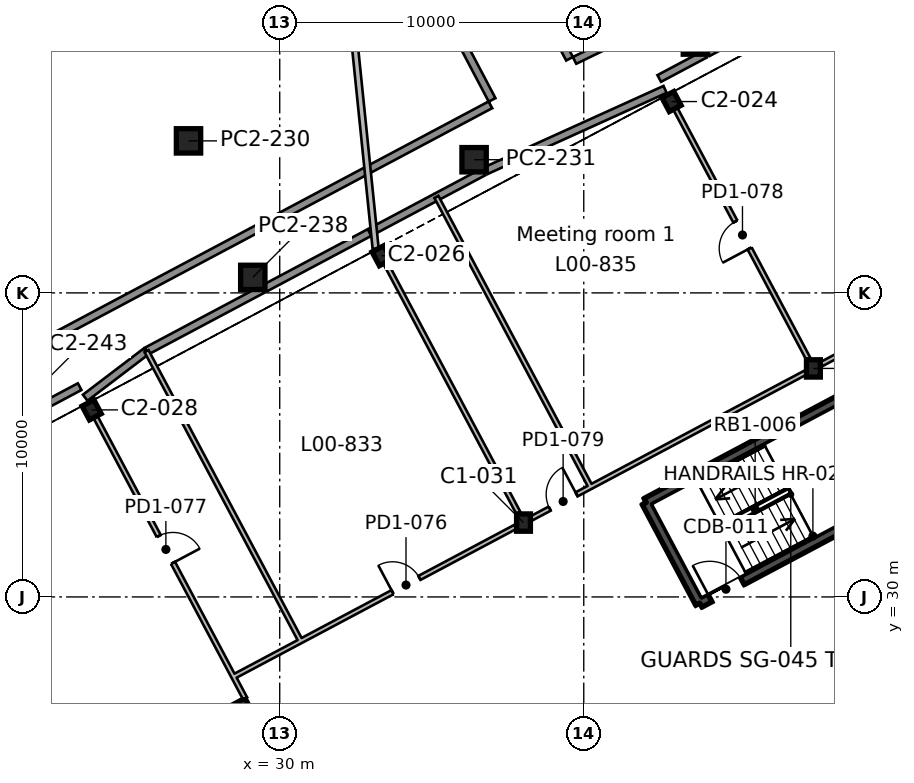
"""IFC4 building model, lengths in metres.
Left out: names, types, materials, properties, quantities, classifications, styles, units other than length and angle.
Written with IfcOpenShell. Run it as: python <this file> out.ifc"""

import sys

from ifc_helpers import new_model, si_unit, direction, frame, frame_2d, origin, origin_2d, place, context, subcontext, project, spatial, rectangle, i_section, extrude, element, fill, save


model = new_model("IFC4")
c1 = context("Model", 3, precision=1e-05, world=origin(), true_north=direction((0.0, 1.0)))
c2 = subcontext(c1, "Body", "Model", "MODEL_VIEW")
j1 = project(units=[si_unit("LENGTHUNIT", "METRE"), si_unit("PLANEANGLEUNIT", "RADIAN")], contexts=[c1])
p1 = place(None, origin())
s1 = spatial("IfcSite", under=j1, at=p1, CompositionType="ELEMENT")
p2 = place(p1, origin())
s2 = spatial("IfcBuilding", under=s1, at=p2, CompositionType="ELEMENT")
p3 = place(p2, origin())
s3 = spatial("IfcBuildingStorey", under=s2, at=p3, CompositionType="ELEMENT", Elevation=0.0)
p4 = place(p3, frame((38.018, 32.446, 0.0), z_axis=(0.0, 0.0, 1.0), x_axis=(1.0, 0.0, 0.0)))
e1 = element("IfcColumn", 1, at=p4, inside=s3, PredefinedType="COLUMN", context=c2, shape_type="SweptSolid", body=[
    extrude(i_section(OverallWidth=0.455, OverallDepth=0.569, WebThickness=0.078, FlangeThickness=0.125, FilletRadius=0.015, at=origin_2d()), origin(), (0.0, 0.0, 1.0), 7.0),
])
p5 = place(p3, frame((23.815, 36.152, 0.0), z_axis=(0.0, 0.0, 1.0), x_axis=(-0.882947592859, -0.469471562786, 0.0)))
e2 = element("IfcColumn", 2, at=p5, inside=s3, PredefinedType="COLUMN", context=c2, shape_type="SweptSolid", body=[
    extrude(i_section(OverallWidth=0.437, OverallDepth=0.513, WebThickness=0.061, FlangeThickness=0.097, FilletRadius=0.015, at=origin_2d()), origin(), (0.0, 0.0, 1.0), 7.0),
])
p6 = place(p3, frame((47.553, 37.516, 0.0), z_axis=(0.0, 0.0, 1.0), x_axis=(1.0, 0.0, 0.0)))
e3 = element("IfcColumn", 3, at=p6, inside=s3, PredefinedType="COLUMN", context=c2, shape_type="SweptSolid", body=[
    extrude(i_section(OverallWidth=0.455, OverallDepth=0.569, WebThickness=0.078, FlangeThickness=0.125, FilletRadius=0.015, at=origin_2d()), origin(), (0.0, 0.0, 1.0), 7.0),
])
for number, where, z_axis, x_axis in (
    (4, (33.351, 41.223, 0.0), (0.0, 0.0, 1.0), (-0.883, -0.469, 0.0)),
    (5, (42.887, 46.293, 0.0), (0.0, 0.0, 1.0), (-0.883, -0.469, 0.0)),
):
    element("IfcColumn", number, at=place(p3, frame(where, z_axis=z_axis, x_axis=x_axis)), inside=s3, PredefinedType="COLUMN", context=c2, shape_type="SweptSolid", body=[
        extrude(i_section(OverallWidth=0.437, OverallDepth=0.513, WebThickness=0.061, FlangeThickness=0.097, FilletRadius=0.015, at=origin_2d()), origin(), (0.0, 0.0, 1.0), 7.0),
    ])
p7 = place(p3, frame((37.849, 8.799, 0.0), z_axis=(0.0, 0.0, 1.0), x_axis=(-0.469465789982, 0.882950662289, 0.0)))
e6 = element("IfcWall", 6, at=p7, inside=s3, PredefinedType="SHEAR", context=c2, shape_type="SweptSolid", body=[
    extrude(rectangle(XDim=20.0, YDim=0.9, at=frame_2d((10.0, 0.0))), origin(), (0.0, 0.0, 1.0), 7.0),
])
p8 = place(p7, frame((10.6, 0.0, 0.0)))
e7 = element("IfcOpeningElement", 7, at=p8, cuts=e6, PredefinedType="OPENING", context=c2, shape_type="SweptSolid", body=[
    extrude(rectangle(XDim=2.4, YDim=2.4, at=frame_2d((1.2, 1.2))), frame((0.0, 0.46, 0.0), z_axis=(0.0, -1.0, 0.0), x_axis=(1.0, 0.0, 0.0)), (0.0, 0.0, 1.0), 0.92),
])
p9 = place(p3, frame((51.145, 33.693, 0.0), z_axis=(0.0, 0.0, 1.0), x_axis=(-0.882945809314, -0.469474917132, 0.0)))
e8 = element("IfcWall", 8, at=p9, inside=s3, PredefinedType="SHEAR", context=c2, shape_type="SweptSolid", body=[
    extrude(rectangle(XDim=8.3, YDim=0.3, at=frame_2d((4.15, 0.0))), origin(), (0.0, 0.0, 1.0), 7.0),
])
p10 = place(p9, frame((6.725, 0.0, 0.0)))
e9 = element("IfcOpeningElement", 9, at=p10, cuts=e8, PredefinedType="OPENING", context=c2, shape_type="SweptSolid", body=[
    extrude(rectangle(XDim=1.2, YDim=2.1, at=frame_2d((0.6, 1.05))), frame((0.0, 0.16, 0.0), z_axis=(0.0, -1.0, 0.0), x_axis=(1.0, 0.0, 0.0)), (0.0, 0.0, 1.0), 0.32),
])
p11 = place(p3, frame((43.816, 29.796, 0.0), z_axis=(0.0, 0.0, 1.0), x_axis=(-0.46946936446, 0.882948761726, 0.0)))
e10 = element("IfcWall", 10, at=p11, inside=s3, PredefinedType="SHEAR", context=c2, shape_type="SweptSolid", body=[
    extrude(rectangle(XDim=3.75, YDim=0.3, at=frame_2d((1.875, 0.0))), origin(), (0.0, 0.0, 1.0), 7.0),
])
p12 = place(p3, frame((42.055, 33.107, 0.0), z_axis=(0.0, 0.0, 1.0), x_axis=(0.882945809314, 0.469474917132, 0.0)))
e11 = element("IfcWall", 11, at=p12, inside=s3, PredefinedType="SHEAR", context=c2, shape_type="SweptSolid", body=[
    extrude(rectangle(XDim=8.3, YDim=0.3, at=frame_2d((4.15, 0.0))), origin(), (0.0, 0.0, 1.0), 7.0),
])
for number, where, z_axis, x_axis in (
    (12, (29.114, 40.51, 0.0), (0.0, 0.0, 1.0), (1.0, 0.0, 0.0)),
    (13, (36.393, 44.38, 0.0), (0.0, 0.0, 1.0), (1.0, 0.0, 0.0)),
    (14, (27.0, 45.0, 0.0), (0.0, 0.0, 1.0), (1.0, 0.0, 0.0)),
    (15, (43.672, 48.25, 0.0), (0.0, 0.0, 1.0), (1.0, 0.0, 0.0)),
):
    element("IfcColumn", number, at=place(p3, frame(where, z_axis=z_axis, x_axis=x_axis)), inside=s3, PredefinedType="COLUMN", context=c2, shape_type="SweptSolid", body=[
        extrude(rectangle(XDim=0.8, YDim=0.8, at=origin_2d()), origin(), (0.0, 0.0, 1.0), 6.37),
    ])
p13 = place(p3, frame((30.357, 58.915, 7.0), z_axis=(0.0, 0.0, 1.0), x_axis=(0.466457319903, -0.8845437065, 0.0)))
e16 = element("IfcWall", 16, at=p13, inside=s3, PredefinedType="STANDARD", context=c2, shape_type="SweptSolid", body=[
    extrude(rectangle(XDim=14.208, YDim=0.25, at=frame_2d((7.104, 0.0))), origin(), (0.0, 0.0, 1.0), 0.65),
])
p14 = place(p3, frame((36.929, 46.186, 7.0), z_axis=(0.0, 0.0, 1.0), x_axis=(-0.882949235495, -0.469468473423, 0.0)))
e17 = element("IfcWall", 17, at=p14, inside=s3, PredefinedType="STANDARD", context=c2, shape_type="SweptSolid", body=[
    extrude(rectangle(XDim=28.414, YDim=0.25, at=frame_2d((14.207, 0.0))), origin(), (0.0, 0.0, 1.0), 0.65),
])
p15 = place(p3, frame((51.808, 53.523, 7.0), z_axis=(0.0, 0.0, 1.0), x_axis=(-0.89970966322, -0.436488856569, 0.0)))
e18 = element("IfcWall", 18, at=p15, inside=s3, PredefinedType="STANDARD", context=c2, shape_type="SweptSolid", body=[
    extrude(rectangle(XDim=13.462, YDim=0.25, at=frame_2d((6.731, 0.0))), origin(), (0.0, 0.0, 1.0), 0.65),
])
p16 = place(p3, frame((39.532, 47.701, 7.0), z_axis=(0.0, 0.0, 1.0), x_axis=(-0.465482185558, 0.88505724952, 0.0)))
e19 = element("IfcWall", 19, at=p16, inside=s3, PredefinedType="STANDARD", context=c2, shape_type="SweptSolid", body=[
    extrude(rectangle(XDim=12.795, YDim=0.25, at=frame_2d((6.398, 0.0))), origin(), (0.0, 0.0, 1.0), 0.65),
])
p17 = place(p3, frame((31.271, 59.866, 0.0), z_axis=(0.0, 0.0, 1.0), x_axis=(0.10182537806, -0.994802288087, 0.0)))
e20 = element("IfcWall", 20, at=p17, inside=s3, PredefinedType="PARTITIONING", context=c2, shape_type="SweptSolid", body=[
    extrude(rectangle(XDim=18.51, YDim=0.2, at=frame_2d((9.255, 0.0))), origin(), (0.0, 0.0, 1.0), 6.37),
])
p18 = place(p3, frame((32.989, 42.004, 0.0), z_axis=(0.0, 0.0, 1.0), x_axis=(0.882961044449, 0.46944626315, 0.0)))
e21 = element("IfcWall", 21, at=p18, inside=s3, PredefinedType="SOLIDWALL", context=c2, shape_type="SweptSolid", body=[
    extrude(rectangle(XDim=2.453, YDim=0.25, at=frame_2d((1.227, 0.0))), origin(), (0.0, 0.0, 1.0), 6.37),
])
p19 = place(p3, frame((35.155, 43.156, 0.0), z_axis=(0.0, 0.0, 1.0), x_axis=(0.882941057782, 0.469483853272, 0.0)))
e22 = element("IfcWall", 22, at=p19, inside=s3, PredefinedType="SOLIDWALL", context=c2, shape_type="SweptSolid", body=[
    extrude(rectangle(XDim=1.756, YDim=0.25, at=frame_2d((0.878, 0.0))), origin(), (0.0, 0.0, 1.0), 6.37),
])
p20 = place(p3, frame((36.793, 44.027, 0.0), z_axis=(0.0, 0.0, 1.0), x_axis=(0.910758391685, 0.412939646892, 0.0)))
e23 = element("IfcWall", 23, at=p20, inside=s3, PredefinedType="SOLIDWALL", context=c2, shape_type="SweptSolid", body=[
    extrude(rectangle(XDim=6.457, YDim=0.25, at=frame_2d((3.229, 0.0))), origin(), (0.0, 0.0, 1.0), 6.37),
])
p21 = place(p3, frame((42.483, 47.052, 0.0), z_axis=(0.0, 0.0, 1.0), x_axis=(0.882940813988, 0.469484311766, 0.0)))
e24 = element("IfcWall", 24, at=p21, inside=s3, PredefinedType="SOLIDWALL", context=c2, shape_type="SweptSolid", body=[
    extrude(rectangle(XDim=1.699, YDim=0.25, at=frame_2d((0.85, 0.0))), origin(), (0.0, 0.0, 1.0), 6.37),
])
p22 = place(p3, frame((44.072, 47.897, 0.0), z_axis=(0.0, 0.0, 1.0), x_axis=(0.882948932855, 0.469469042612, 0.0)))
e25 = element("IfcWall", 25, at=p22, inside=s3, PredefinedType="SOLIDWALL", context=c2, shape_type="SweptSolid", body=[
    extrude(rectangle(XDim=7.849, YDim=0.25, at=frame_2d((3.924, 0.0))), origin(), (0.0, 0.0, 1.0), 6.37),
])
p23 = place(p22, frame((3.424, 0.0, 0.0)))
e26 = element("IfcOpeningElement", 26, at=p23, cuts=e25, PredefinedType="OPENING", context=c2, shape_type="SweptSolid", body=[
    extrude(rectangle(XDim=1.0, YDim=2.1, at=frame_2d((0.5, 1.05))), frame((0.0, 0.135, 0.0), z_axis=(0.0, -1.0, 0.0), x_axis=(1.0, 0.0, 0.0)), (0.0, 0.0, 1.0), 0.27),
])
p24 = place(p3, frame((23.603, 36.552, 0.0), z_axis=(0.0, 0.0, 1.0), x_axis=(0.796006775893, 0.605287710706, 0.0)))
e27 = element("IfcWall", 27, at=p24, inside=s3, PredefinedType="SOLIDWALL", context=c2, shape_type="SweptSolid", body=[
    extrude(rectangle(XDim=2.513, YDim=0.25, at=frame_2d((1.256, 0.0))), origin(), (0.0, 0.0, 1.0), 6.37),
])
p25 = place(p3, frame((25.619, 38.085, 0.0), z_axis=(0.0, 0.0, 1.0), x_axis=(0.88292581618, 0.469512516471, 0.0)))
e28 = element("IfcWall", 28, at=p25, inside=s3, PredefinedType="SOLIDWALL", context=c2, shape_type="SweptSolid", body=[
    extrude(rectangle(XDim=4.313, YDim=0.25, at=frame_2d((2.156, 0.0))), origin(), (0.0, 0.0, 1.0), 6.37),
])
p26 = place(p3, frame((29.514, 40.156, 0.0), z_axis=(0.0, 0.0, 1.0), x_axis=(0.882952549127, 0.469462241283, 0.0)))
e29 = element("IfcWall", 29, at=p26, inside=s3, PredefinedType="SOLIDWALL", context=c2, shape_type="SweptSolid", body=[
    extrude(rectangle(XDim=3.895, YDim=0.25, at=frame_2d((1.948, 0.0))), origin(), (0.0, 0.0, 1.0), 6.37),
])
p27 = place(p3, frame((22.236, 36.287, 0.0), z_axis=(0.0, 0.0, 1.0), x_axis=(0.882931801402, 0.469501260993, 0.0)))
e30 = element("IfcWall", 30, at=p27, inside=s3, PredefinedType="SOLIDWALL", context=c2, shape_type="SweptSolid", body=[
    extrude(rectangle(XDim=1.341, YDim=0.25, at=frame_2d((0.67, 0.0))), origin(), (0.0, 0.0, 1.0), 6.37),
])
p28 = place(p3, frame((30.689, 28.549, 0.0), z_axis=(0.0, 0.0, 1.0), x_axis=(-0.882976601649, -0.46941700112, 0.0)))
e31 = element("IfcWall", 31, at=p28, inside=s3, PredefinedType="PARTITIONING", context=c2, shape_type="SweptSolid", body=[
    extrude(rectangle(XDim=2.5, YDim=0.15, at=frame_2d((1.25, 0.0))), origin(), (0.0, 0.0, 1.0), 6.55),
])
p29 = place(p3, frame((37.755, 32.307, 0.0), z_axis=(0.0, 0.0, 1.0), x_axis=(-0.882938312015, -0.469489017099, 0.0)))
e32 = element("IfcWall", 32, at=p29, inside=s3, PredefinedType="PARTITIONING", context=c2, shape_type="SweptSolid", body=[
    extrude(rectangle(XDim=8.003, YDim=0.15, at=frame_2d((4.001, 0.0))), origin(), (0.0, 0.0, 1.0), 6.55),
])
p30 = place(p29, frame((3.58, 0.0, 0.0)))
e33 = element("IfcOpeningElement", 33, at=p30, cuts=e32, PredefinedType="OPENING", context=c2, shape_type="SweptSolid", body=[
    extrude(rectangle(XDim=1.0, YDim=2.1, at=frame_2d((0.5, 1.05))), frame((0.0, 0.085, 0.0), z_axis=(0.0, -1.0, 0.0), x_axis=(1.0, 0.0, 0.0)), (0.0, 0.0, 1.0), 0.17),
])
p31 = place(p3, frame((40.225, 33.62, 0.0), z_axis=(0.0, 0.0, 1.0), x_axis=(-0.882972129196, -0.469425413739, 0.0)))
e34 = element("IfcWall", 34, at=p31, inside=s3, PredefinedType="PARTITIONING", context=c2, shape_type="SweptSolid", body=[
    extrude(rectangle(XDim=2.202, YDim=0.15, at=frame_2d((1.101, 0.0))), origin(), (0.0, 0.0, 1.0), 6.55),
])
p32 = place(p31, frame((0.523, 0.0, 0.0)))
e35 = element("IfcOpeningElement", 35, at=p32, cuts=e34, PredefinedType="OPENING", context=c2, shape_type="SweptSolid", body=[
    extrude(rectangle(XDim=1.0, YDim=2.1, at=frame_2d((0.5, 1.05))), frame((0.0, 0.085, 0.0), z_axis=(0.0, -1.0, 0.0), x_axis=(1.0, 0.0, 0.0)), (0.0, 0.0, 1.0), 0.17),
])
p33 = place(p3, frame((47.291, 37.376, 0.0), z_axis=(0.0, 0.0, 1.0), x_axis=(-0.882950155787, -0.469466742588, 0.0)))
e36 = element("IfcWall", 36, at=p33, inside=s3, PredefinedType="PARTITIONING", context=c2, shape_type="SweptSolid", body=[
    extrude(rectangle(XDim=8.002, YDim=0.15, at=frame_2d((4.001, 0.0))), origin(), (0.0, 0.0, 1.0), 6.55),
])
p34 = place(p3, frame((58.046, 43.095, 0.0), z_axis=(0.0, 0.0, 1.0), x_axis=(-0.882944872937, -0.469476678179, 0.0)))
e37 = element("IfcWall", 37, at=p34, inside=s3, PredefinedType="PARTITIONING", context=c2, shape_type="SweptSolid", body=[
    extrude(rectangle(XDim=11.586, YDim=0.15, at=frame_2d((5.793, 0.0))), origin(), (0.0, 0.0, 1.0), 6.55),
])
p35 = place(p34, frame((5.314, 0.0, 0.0)))
e38 = element("IfcOpeningElement", 38, at=p35, cuts=e37, PredefinedType="OPENING", context=c2, shape_type="SweptSolid", body=[
    extrude(rectangle(XDim=1.0, YDim=2.1, at=frame_2d((0.5, 1.05))), frame((0.0, 0.085, 0.0), z_axis=(0.0, -1.0, 0.0), x_axis=(1.0, 0.0, 0.0)), (0.0, 0.0, 1.0), 0.17),
])
p36 = place(p3, frame((28.485, 27.371, 0.0), z_axis=(0.0, 0.0, 1.0), x_axis=(0.469454908155, -0.882956448082, 0.0)))
e39 = element("IfcWall", 39, at=p36, inside=s3, PredefinedType="PARTITIONING", context=c2, shape_type="SweptSolid", body=[
    extrude(rectangle(XDim=0.794, YDim=0.15, at=frame_2d((0.397, 0.0))), origin(), (0.0, 0.0, 1.0), 6.55),
])
p37 = place(p3, frame((30.689, 28.549, 0.0), z_axis=(0.0, 0.0, 1.0), x_axis=(-0.469470880923, 0.882947955411, 0.0)))
e40 = element("IfcWall", 40, at=p37, inside=s3, PredefinedType="PARTITIONING", context=c2, shape_type="SweptSolid", body=[
    extrude(rectangle(XDim=10.8, YDim=0.15, at=frame_2d((5.4, 0.0))), origin(), (0.0, 0.0, 1.0), 6.55),
])
p38 = place(p3, frame((23.936, 35.926, 0.0), z_axis=(0.0, 0.0, 1.0), x_axis=(0.469473365889, -0.882946634129, 0.0)))
e41 = element("IfcWall", 41, at=p38, inside=s3, PredefinedType="PARTITIONING", context=c2, shape_type="SweptSolid", body=[
    extrude(rectangle(XDim=9.687, YDim=0.15, at=frame_2d((4.844, 0.0))), origin(), (0.0, 0.0, 1.0), 6.55),
])
p39 = place(p38, frame((4.442, 0.0, 0.0)))
e42 = element("IfcOpeningElement", 42, at=p39, cuts=e41, PredefinedType="OPENING", context=c2, shape_type="SweptSolid", body=[
    extrude(rectangle(XDim=1.0, YDim=2.1, at=frame_2d((0.5, 1.05))), frame((0.0, 0.085, 0.0), z_axis=(0.0, -1.0, 0.0), x_axis=(1.0, 0.0, 0.0)), (0.0, 0.0, 1.0), 0.17),
])
p40 = place(p3, frame((37.85, 32.762, 0.0), z_axis=(0.0, 0.0, 1.0), x_axis=(-0.469481854544, 0.882942120557, 0.0)))
e43 = element("IfcWall", 43, at=p40, inside=s3, PredefinedType="PARTITIONING", context=c2, shape_type="SweptSolid", body=[
    extrude(rectangle(XDim=9.326, YDim=0.15, at=frame_2d((4.663, 0.0))), origin(), (0.0, 0.0, 1.0), 6.55),
])
p41 = place(p3, frame((40.225, 33.62, 0.0), z_axis=(0.0, 0.0, 1.0), x_axis=(-0.469470880923, 0.882947955411, 0.0)))
e44 = element("IfcWall", 44, at=p41, inside=s3, PredefinedType="PARTITIONING", context=c2, shape_type="SweptSolid", body=[
    extrude(rectangle(XDim=10.8, YDim=0.15, at=frame_2d((5.4, 0.0))), origin(), (0.0, 0.0, 1.0), 6.55),
])
p42 = place(p3, frame((47.385, 37.832, 0.0), z_axis=(0.0, 0.0, 1.0), x_axis=(-0.469472297485, 0.882947202212, 0.0)))
e45 = element("IfcWall", 45, at=p42, inside=s3, PredefinedType="PARTITIONING", context=c2, shape_type="SweptSolid", body=[
    extrude(rectangle(XDim=9.326, YDim=0.15, at=frame_2d((4.663, 0.0))), origin(), (0.0, 0.0, 1.0), 6.55),
])
p43 = place(p42, frame((4.112, 0.0, 0.0)))
e46 = element("IfcOpeningElement", 46, at=p43, cuts=e45, PredefinedType="OPENING", context=c2, shape_type="SweptSolid", body=[
    extrude(rectangle(XDim=1.0, YDim=2.1, at=frame_2d((0.5, 1.05))), frame((0.0, 0.085, 0.0), z_axis=(0.0, -1.0, 0.0), x_axis=(1.0, 0.0, 0.0)), (0.0, 0.0, 1.0), 0.17),
])
p44 = place(p10, frame((1.2, 0.0, 0.0), z_axis=(0.0, 0.0, 1.0), x_axis=(-1.0, 0.0, 0.0)))
e47 = element("IfcDoor", 47, at=p44, inside=s3, OperationType="SINGLE_SWING_LEFT", PredefinedType="DOOR", context=c2, shape_type="SweptSolid", body=[
    extrude(rectangle(XDim=1.2, YDim=2.1, at=frame_2d((0.6, 1.05))), frame((0.0, 0.025, 0.0), z_axis=(0.0, -1.0, 0.0), x_axis=(1.0, 0.0, 0.0)), (0.0, 0.0, 1.0), 0.05),
])
fill(e9, e47)
p45 = place(p39, origin())
e48 = element("IfcDoor", 48, at=p45, inside=s3, OperationType="SINGLE_SWING_RIGHT", PredefinedType="DOOR", context=c2, shape_type="SweptSolid", body=[
    extrude(rectangle(XDim=1.0, YDim=2.1, at=frame_2d((0.5, 1.05))), frame((0.0, 0.025, 0.0), z_axis=(0.0, -1.0, 0.0), x_axis=(1.0, 0.0, 0.0)), (0.0, 0.0, 1.0), 0.05),
])
fill(e42, e48)
p46 = place(p30, frame((1.0, 0.0, 0.0), z_axis=(0.0, 0.0, 1.0), x_axis=(-1.0, 0.0, 0.0)))
e49 = element("IfcDoor", 49, at=p46, inside=s3, OperationType="SINGLE_SWING_LEFT", PredefinedType="DOOR", context=c2, shape_type="SweptSolid", body=[
    extrude(rectangle(XDim=1.0, YDim=2.1, at=frame_2d((0.5, 1.05))), frame((0.0, 0.025, 0.0), z_axis=(0.0, -1.0, 0.0), x_axis=(1.0, 0.0, 0.0)), (0.0, 0.0, 1.0), 0.05),
])
fill(e33, e49)
p47 = place(p32, frame((1.0, 0.0, 0.0), z_axis=(0.0, 0.0, 1.0), x_axis=(-1.0, 0.0, 0.0)))
e50 = element("IfcDoor", 50, at=p47, inside=s3, OperationType="SINGLE_SWING_RIGHT", PredefinedType="DOOR", context=c2, shape_type="SweptSolid", body=[
    extrude(rectangle(XDim=1.0, YDim=2.1, at=frame_2d((0.5, 1.05))), frame((0.0, 0.025, 0.0), z_axis=(0.0, -1.0, 0.0), x_axis=(1.0, 0.0, 0.0)), (0.0, 0.0, 1.0), 0.05),
])
fill(e35, e50)
p48 = place(p43, origin())
e51 = element("IfcDoor", 51, at=p48, inside=s3, OperationType="SINGLE_SWING_LEFT", PredefinedType="DOOR", context=c2, shape_type="SweptSolid", body=[
    extrude(rectangle(XDim=1.0, YDim=2.1, at=frame_2d((0.5, 1.05))), frame((0.0, 0.025, 0.0), z_axis=(0.0, -1.0, 0.0), x_axis=(1.0, 0.0, 0.0)), (0.0, 0.0, 1.0), 0.05),
])
fill(e46, e51)
save(model, sys.argv[1])
